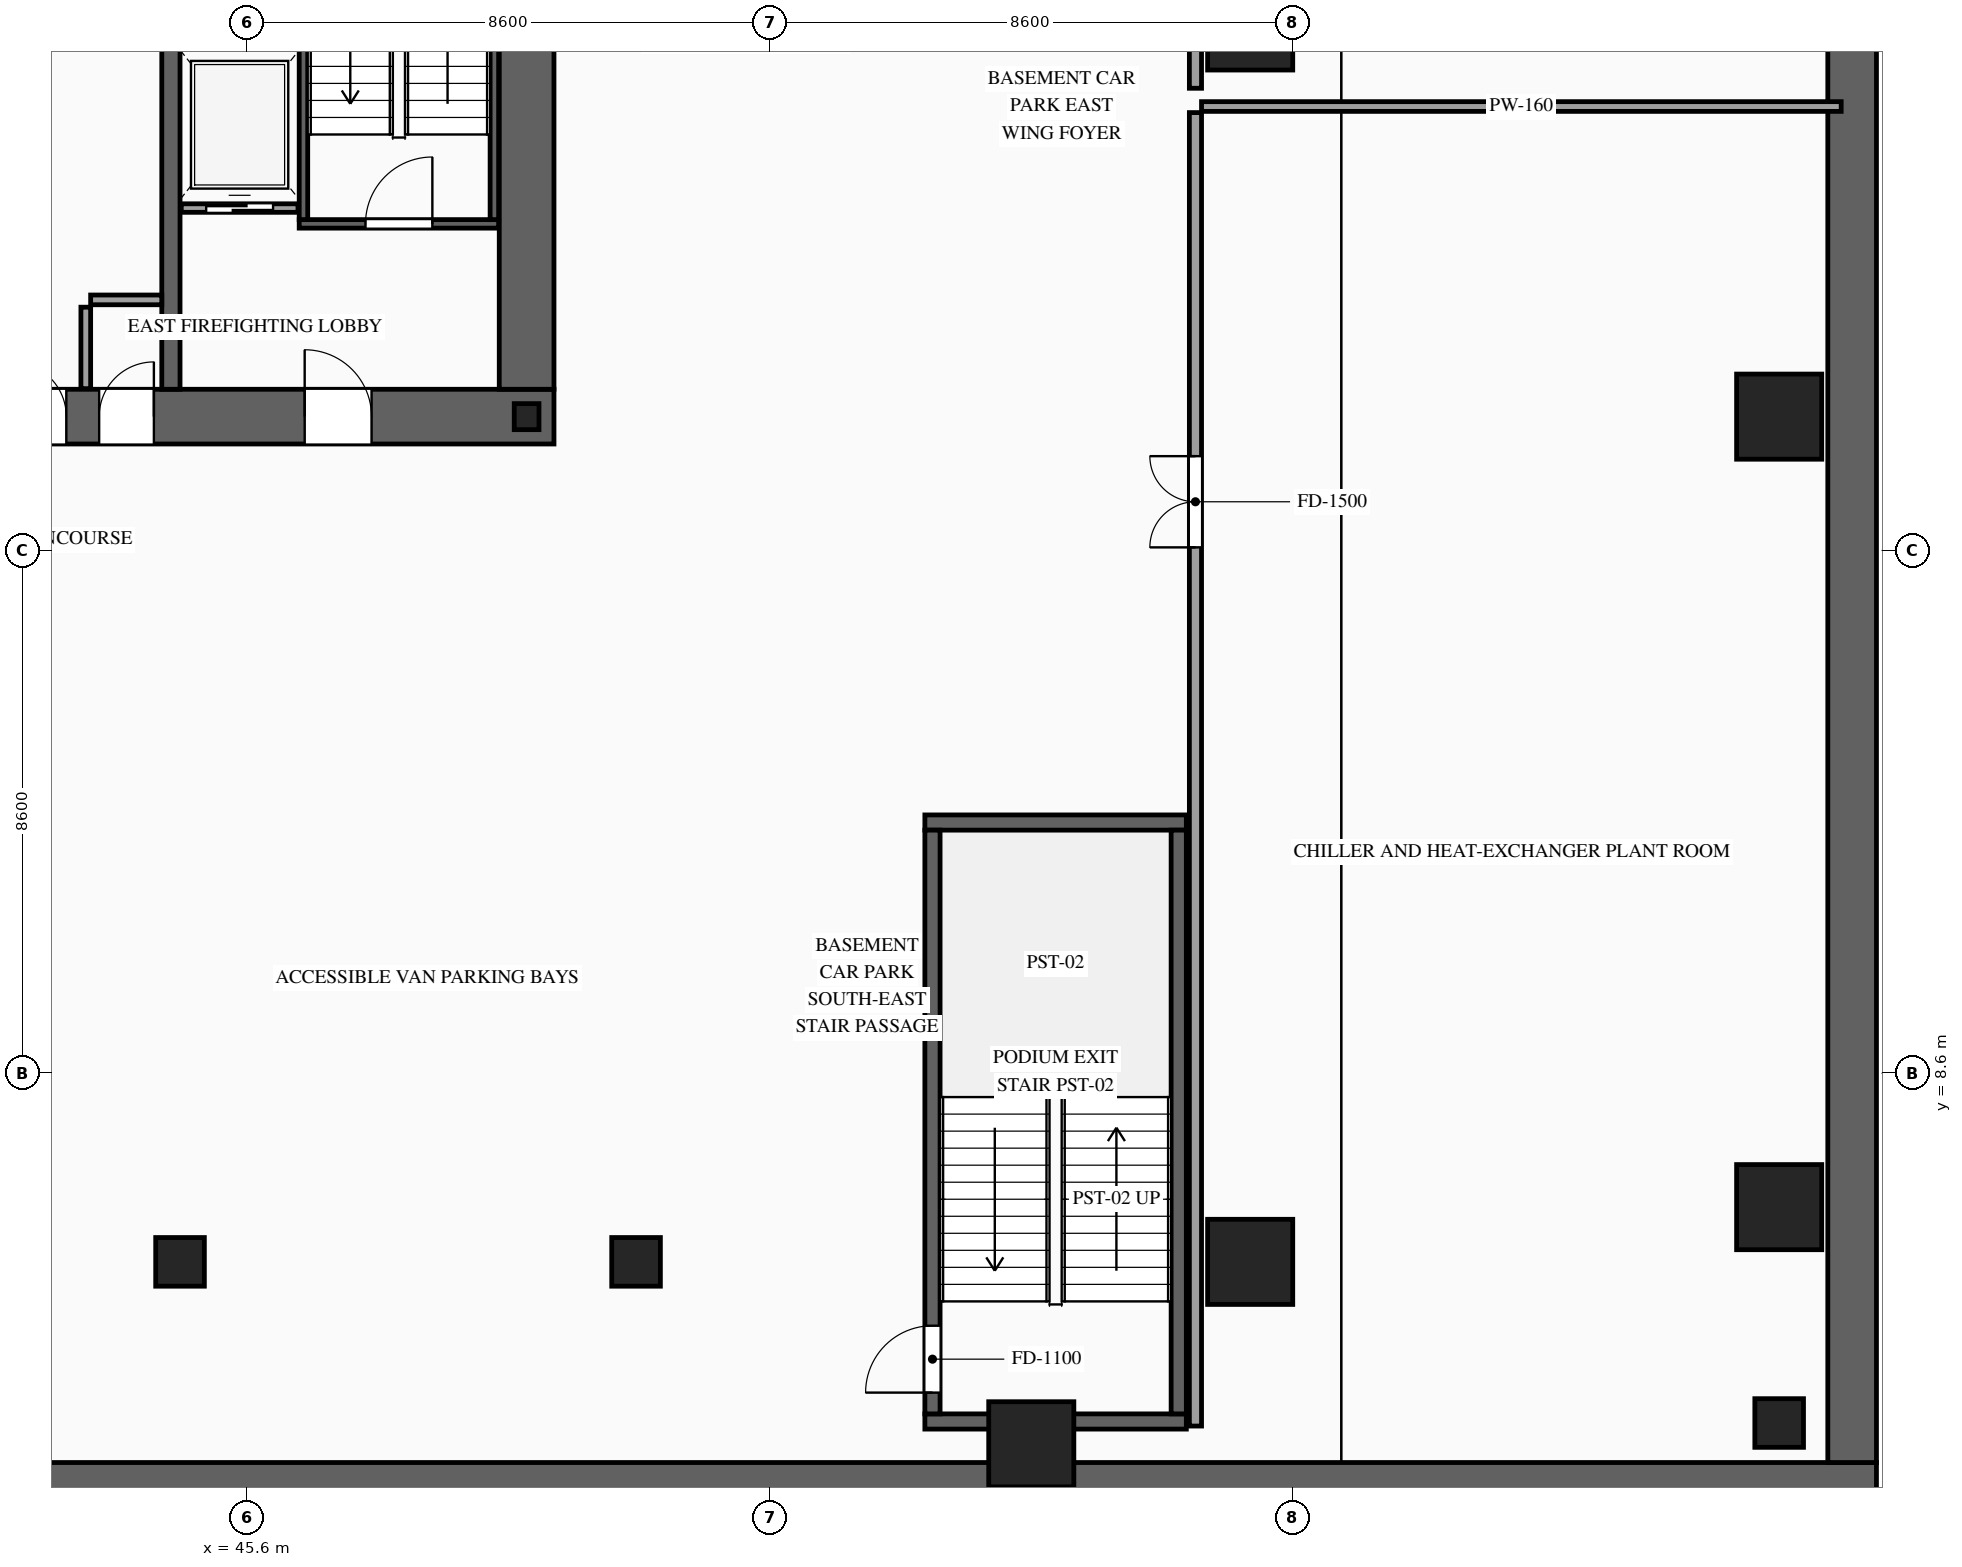
"""IFC4 building model, lengths in metres.
Left out: names, types, materials, properties, quantities, classifications, styles, units other than length and angle.
Written with IfcOpenShell. Run it as: python <this file> out.ifc"""

import sys

from ifc_helpers import new_model, si_unit, direction, frame, frame_2d, origin, origin_2d, place, context, subcontext, project, spatial, rectangle, i_section, extrude, source, transform, mapped, element, fill, save


model = new_model("IFC4")
c1 = context("Model", 3, precision=1e-05, world=origin(), true_north=direction((0.0, 1.0)))
c2 = subcontext(c1, "Body", "Model", "MODEL_VIEW")
j1 = project(units=[si_unit("LENGTHUNIT", "METRE"), si_unit("PLANEANGLEUNIT", "RADIAN")], contexts=[c1])
p1 = place(None, origin())
s1 = spatial("IfcSite", under=j1, at=p1, CompositionType="ELEMENT")
p2 = place(p1, origin())
s2 = spatial("IfcBuilding", under=s1, at=p2, CompositionType="ELEMENT")
p3 = place(p2, frame((0.0, 0.0, -9.0)))
s3 = spatial("IfcBuildingStorey", under=s2, at=p3, CompositionType="ELEMENT", Elevation=-9.0)
m1 = source(origin(), c2, "Body", "SweptSolid", [
    extrude(rectangle(XDim=70.8, YDim=0.8, at=frame_2d((35.4, 0.0))), origin(), (0.0, 0.0, 1.0), 4.5),
])
p4 = place(p3, frame((1.6, 1.8, 0.0), z_axis=(0.0, 0.0, 1.0), x_axis=(1.0, 0.0, 0.0)))
e1 = element("IfcWall", 1, at=p4, inside=s3, PredefinedType="USERDEFINED", context=c2, shape_type="MappedRepresentation", body=[
    mapped(m1, transform((0.0, 0.0, 0.0), scale=1.0)),
])
m2 = source(origin(), c2, "Body", "SweptSolid", [
    extrude(rectangle(XDim=47.2, YDim=0.8, at=frame_2d((23.6, 0.0))), origin(), (0.0, 0.0, 1.0), 4.5),
])
p5 = place(p3, frame((72.0, 2.2, 0.0), z_axis=(0.0, 0.0, 1.0), x_axis=(0.0, 1.0, 0.0)))
e2 = element("IfcWall", 2, at=p5, inside=s3, PredefinedType="USERDEFINED", context=c2, shape_type="MappedRepresentation", body=[
    mapped(m2, transform((0.0, 0.0, 0.0), scale=1.0)),
])
p6 = place(p3, frame((23.35, 19.4, 0.0), z_axis=(0.0, 0.0, 1.0), x_axis=(1.0, 0.0, 0.0)))
e3 = element("IfcWall", 3, at=p6, inside=s3, PredefinedType="SHEAR", context=c2, shape_type="SweptSolid", body=[
    extrude(rectangle(XDim=27.3, YDim=0.9, at=frame_2d((13.65, 0.0))), origin(), (0.0, 0.0, 1.0), 4.5),
])
p7 = place(p6, frame((2.1, 0.0, 0.0)))
e4 = element("IfcOpeningElement", 4, at=p7, cuts=e3, PredefinedType="OPENING", context=c2, shape_type="SweptSolid", body=[
    extrude(rectangle(XDim=1.1, YDim=2.2, at=frame_2d((0.55, 1.1))), frame((0.0, 0.465, 0.0), z_axis=(0.0, -1.0, 0.0), x_axis=(1.0, 0.0, 0.0)), (0.0, 0.0, 1.0), 0.93),
])
p8 = place(p6, frame((10.0, 0.0, 0.0)))
e5 = element("IfcOpeningElement", 5, at=p8, cuts=e3, PredefinedType="OPENING", context=c2, shape_type="SweptSolid", body=[
    extrude(rectangle(XDim=1.1, YDim=2.2, at=frame_2d((0.55, 1.1))), frame((0.0, 0.465, 0.0), z_axis=(0.0, -1.0, 0.0), x_axis=(1.0, 0.0, 0.0)), (0.0, 0.0, 1.0), 0.93),
])
p9 = place(p6, frame((23.2, 0.0, 0.0)))
e6 = element("IfcOpeningElement", 6, at=p9, cuts=e3, PredefinedType="OPENING", context=c2, shape_type="SweptSolid", body=[
    extrude(rectangle(XDim=1.1, YDim=2.2, at=frame_2d((0.55, 1.1))), frame((0.0, 0.465, 0.0), z_axis=(0.0, -1.0, 0.0), x_axis=(1.0, 0.0, 0.0)), (0.0, 0.0, 1.0), 0.93),
])
p10 = place(p6, frame((19.82, 0.0, 0.0)))
e7 = element("IfcOpeningElement", 7, at=p10, cuts=e3, PredefinedType="OPENING", context=c2, shape_type="SweptSolid", body=[
    extrude(rectangle(XDim=0.9, YDim=2.15, at=frame_2d((0.45, 1.075))), frame((0.0, 0.465, 0.0), z_axis=(0.0, -1.0, 0.0), x_axis=(1.0, 0.0, 0.0)), (0.0, 0.0, 1.0), 0.93),
])
p11 = place(p6, frame((18.38, 0.0, 0.0)))
e8 = element("IfcOpeningElement", 8, at=p11, cuts=e3, PredefinedType="OPENING", context=c2, shape_type="SweptSolid", body=[
    extrude(rectangle(XDim=0.9, YDim=2.15, at=frame_2d((0.45, 1.075))), frame((0.0, 0.465, 0.0), z_axis=(0.0, -1.0, 0.0), x_axis=(1.0, 0.0, 0.0)), (0.0, 0.0, 1.0), 0.93),
])
m3 = source(origin(), c2, "Body", "SweptSolid", [
    extrude(rectangle(XDim=11.9, YDim=0.9, at=frame_2d((5.95, 0.0))), origin(), (0.0, 0.0, 1.0), 4.5),
])
p12 = place(p3, frame((50.2, 19.85, 0.0), z_axis=(0.0, 0.0, 1.0), x_axis=(0.0, 1.0, 0.0)))
e9 = element("IfcWall", 9, at=p12, inside=s3, PredefinedType="SHEAR", context=c2, shape_type="MappedRepresentation", body=[
    mapped(m3, transform((0.0, 0.0, 0.0), scale=1.0)),
])
m4 = source(origin(), c2, "Body", "SweptSolid", [
    extrude(rectangle(XDim=11.9, YDim=0.3, at=frame_2d((5.95, 0.0))), origin(), (0.0, 0.0, 1.0), 4.5),
])
p13 = place(p3, frame((44.35, 19.85, 0.0), z_axis=(0.0, 0.0, 1.0), x_axis=(0.0, 1.0, 0.0)))
e10 = element("IfcWall", 10, at=p13, inside=s3, PredefinedType="SOLIDWALL", context=c2, shape_type="MappedRepresentation", body=[
    mapped(m4, transform((0.0, 0.0, 0.0), scale=1.0)),
])
m5 = source(origin(), c2, "Body", "SweptSolid", [
    extrude(rectangle(XDim=0.8, YDim=0.8, at=origin_2d()), origin(), (0.0, 0.0, 1.0), 4.2),
])
for number, where, z_axis, x_axis in (
    (11, (44.5, 5.5, 0.0), (0.0, 0.0, 1.0), (1.0, 0.0, 0.0)),
    (12, (52.0, 5.5, 0.0), (0.0, 0.0, 1.0), (1.0, 0.0, 0.0)),
):
    element("IfcColumn", number, at=place(p3, frame(where, z_axis=z_axis, x_axis=x_axis)), inside=s3, PredefinedType="COLUMN", context=c2, shape_type="MappedRepresentation", body=[
        mapped(m5, transform((0.0, 0.0, 0.0), scale=1.0)),
    ])
m6 = source(origin(), c2, "Body", "SweptSolid", [
    extrude(i_section(OverallWidth=0.407, OverallDepth=0.428, WebThickness=0.02, FlangeThickness=0.035, at=origin_2d()), origin(), (0.0, 0.0, 1.0), 4.5),
])
p14 = place(p3, frame((50.2, 19.4, 0.0), z_axis=(0.0, 0.0, 1.0), x_axis=(1.0, 0.0, 0.0)))
e13 = element("IfcColumn", 13, at=p14, inside=s3, PredefinedType="COLUMN", context=c2, shape_type="MappedRepresentation", body=[
    mapped(m6, transform((0.0, 0.0, 0.0), scale=1.0)),
])
m7 = source(origin(), c2, "Body", "SweptSolid", [
    extrude(rectangle(XDim=0.8, YDim=0.8, at=origin_2d()), origin(), (0.0, 0.0, 1.0), 4.5),
])
p15 = place(p3, frame((70.8, 2.85, 0.0), z_axis=(0.0, 0.0, 1.0), x_axis=(1.0, 0.0, 0.0)))
e14 = element("IfcColumn", 14, at=p15, inside=s3, PredefinedType="COLUMN", context=c2, shape_type="MappedRepresentation", body=[
    mapped(m7, transform((0.0, 0.0, 0.0), scale=1.0)),
])
m8 = source(origin(), c2, "Body", "SweptSolid", [
    extrude(rectangle(XDim=1.4, YDim=1.4, at=origin_2d()), origin(), (0.0, 0.0, 1.0), 4.5),
])
for number, where, z_axis, x_axis in (
    (15, (70.8, 6.4, 0.0), (0.0, 0.0, 1.0), (1.0, 0.0, 0.0)),
    (16, (70.8, 19.4, 0.0), (0.0, 0.0, 1.0), (1.0, 0.0, 0.0)),
    (17, (62.1, 5.5, 0.0), (0.0, 0.0, 1.0), (1.0, 0.0, 0.0)),
    (18, (62.1, 25.8, 0.0), (0.0, 0.0, 1.0), (1.0, 0.0, 0.0)),
    (19, (58.5, 2.5, 0.0), (0.0, 0.0, 1.0), (1.0, 0.0, 0.0)),
):
    element("IfcColumn", number, at=place(p3, frame(where, z_axis=z_axis, x_axis=x_axis)), inside=s3, PredefinedType="COLUMN", context=c2, shape_type="MappedRepresentation", body=[
        mapped(m8, transform((0.0, 0.0, 0.0), scale=1.0)),
    ])
p16 = place(p3, frame((44.52, 22.83, 0.0), z_axis=(0.0, 0.0, 1.0), x_axis=(1.0, 0.0, 0.0)))
e20 = element("IfcWall", 20, at=p16, inside=s3, PredefinedType="SOLIDWALL", context=c2, shape_type="SweptSolid", body=[
    extrude(rectangle(XDim=1.92, YDim=0.14, at=frame_2d((0.96, 0.0))), origin(), (0.0, 0.0, 1.0), 4.2),
])
p17 = place(p16, frame((0.41, 0.0, 0.0)))
e21 = element("IfcOpeningElement", 21, at=p17, cuts=e20, PredefinedType="OPENING", context=c2, shape_type="SweptSolid", body=[
    extrude(rectangle(XDim=1.1, YDim=2.2, at=frame_2d((0.55, 1.1))), frame((0.0, 0.085, 0.0), z_axis=(0.0, -1.0, 0.0), x_axis=(1.0, 0.0, 0.0)), (0.0, 0.0, 1.0), 0.17),
])
p18 = place(p3, frame((46.46, 22.57, 0.0), z_axis=(0.0, 0.0, 1.0), x_axis=(1.0, 0.0, 0.0)))
e22 = element("IfcWall", 22, at=p18, inside=s3, PredefinedType="SOLIDWALL", context=c2, shape_type="SweptSolid", body=[
    extrude(rectangle(XDim=3.28, YDim=0.14, at=frame_2d((1.64, 0.0))), origin(), (0.0, 0.0, 1.0), 4.2),
])
p19 = place(p18, frame((1.09, 0.0, 0.0)))
e23 = element("IfcOpeningElement", 23, at=p19, cuts=e22, PredefinedType="OPENING", context=c2, shape_type="SweptSolid", body=[
    extrude(rectangle(XDim=1.1, YDim=2.2, at=frame_2d((0.55, 1.1))), frame((0.0, 0.085, 0.0), z_axis=(0.0, -1.0, 0.0), x_axis=(1.0, 0.0, 0.0)), (0.0, 0.0, 1.0), 0.17),
])
m9 = source(origin(), c2, "Body", "SweptSolid", [
    extrude(rectangle(XDim=8.94, YDim=0.14, at=frame_2d((4.47, 0.0))), origin(), (0.0, 0.0, 1.0), 4.2),
])
for number, where, z_axis, x_axis in (
    (24, (46.53, 22.64, 0.0), (0.0, 0.0, 1.0), (0.0, 1.0, 0.0)),
    (25, (49.67, 22.64, 0.0), (0.0, 0.0, 1.0), (0.0, 1.0, 0.0)),
):
    element("IfcWall", number, at=place(p3, frame(where, z_axis=z_axis, x_axis=x_axis)), inside=s3, PredefinedType="SOLIDWALL", context=c2, shape_type="MappedRepresentation", body=[
        mapped(m9, transform((0.0, 0.0, 0.0), scale=1.0)),
    ])
m10 = source(origin(), c2, "Body", "SweptSolid", [
    extrude(rectangle(XDim=4.3, YDim=0.25, at=frame_2d((2.15, 0.0))), origin(), (0.0, 0.0, 1.0), 4.2),
])
for number, where, z_axis, x_axis in (
    (26, (56.75, 2.875, 0.0), (0.0, 0.0, 1.0), (1.0, 0.0, 0.0)),
    (27, (56.75, 12.725, 0.0), (0.0, 0.0, 1.0), (1.0, 0.0, 0.0)),
):
    element("IfcWall", number, at=place(p3, frame(where, z_axis=z_axis, x_axis=x_axis)), inside=s3, PredefinedType="SOLIDWALL", context=c2, shape_type="MappedRepresentation", body=[
        mapped(m10, transform((0.0, 0.0, 0.0), scale=1.0)),
    ])
p20 = place(p3, frame((56.875, 3.0, 0.0), z_axis=(0.0, 0.0, 1.0), x_axis=(0.0, 1.0, 0.0)))
e28 = element("IfcWall", 28, at=p20, inside=s3, PredefinedType="SOLIDWALL", context=c2, shape_type="SweptSolid", body=[
    extrude(rectangle(XDim=9.6, YDim=0.25, at=frame_2d((4.8, 0.0))), origin(), (0.0, 0.0, 1.0), 4.2),
])
p21 = place(p20, frame((0.35, 0.0, 0.0)))
e29 = element("IfcOpeningElement", 29, at=p21, cuts=e28, PredefinedType="OPENING", context=c2, shape_type="SweptSolid", body=[
    extrude(rectangle(XDim=1.1, YDim=2.2, at=frame_2d((0.55, 1.1))), frame((0.0, 0.14, 0.0), z_axis=(0.0, -1.0, 0.0), x_axis=(1.0, 0.0, 0.0)), (0.0, 0.0, 1.0), 0.28),
])
m11 = source(origin(), c2, "Body", "SweptSolid", [
    extrude(rectangle(XDim=9.6, YDim=0.25, at=frame_2d((4.8, 0.0))), origin(), (0.0, 0.0, 1.0), 4.2),
])
p22 = place(p3, frame((60.925, 3.0, 0.0), z_axis=(0.0, 0.0, 1.0), x_axis=(0.0, 1.0, 0.0)))
e30 = element("IfcWall", 30, at=p22, inside=s3, PredefinedType="SOLIDWALL", context=c2, shape_type="MappedRepresentation", body=[
    mapped(m11, transform((0.0, 0.0, 0.0), scale=1.0)),
])
m12 = source(origin(), c2, "Body", "SweptSolid", [
    extrude(rectangle(XDim=1.34, YDim=0.16, at=frame_2d((0.67, 0.0))), origin(), (0.0, 0.0, 1.0), 4.2),
])
p23 = place(p3, frame((42.95, 19.86, 0.0), z_axis=(0.0, 0.0, 1.0), x_axis=(0.0, 1.0, 0.0)))
e31 = element("IfcWall", 31, at=p23, inside=s3, PredefinedType="PARTITIONING", context=c2, shape_type="MappedRepresentation", body=[
    mapped(m12, transform((0.0, 0.0, 0.0), scale=1.0)),
])
m13 = source(origin(), c2, "Body", "SweptSolid", [
    extrude(rectangle(XDim=1.17, YDim=0.16, at=frame_2d((0.585, 0.0))), origin(), (0.0, 0.0, 1.0), 4.2),
])
p24 = place(p3, frame((43.03, 21.32, 0.0), z_axis=(0.0, 0.0, 1.0), x_axis=(1.0, 0.0, 0.0)))
e32 = element("IfcWall", 32, at=p24, inside=s3, PredefinedType="PARTITIONING", context=c2, shape_type="MappedRepresentation", body=[
    mapped(m13, transform((0.0, 0.0, 0.0), scale=1.0)),
])
p25 = place(p3, frame((61.2, 2.8, 0.0), z_axis=(0.0, 0.0, 1.0), x_axis=(0.0, 1.0, 0.0)))
e33 = element("IfcWall", 33, at=p25, inside=s3, PredefinedType="PARTITIONING", context=c2, shape_type="SweptSolid", body=[
    extrude(rectangle(XDim=21.6, YDim=0.2, at=frame_2d((10.8, 0.0))), origin(), (0.0, 0.0, 1.0), 4.2),
])
p26 = place(p25, frame((14.45, 0.0, 0.0)))
e34 = element("IfcOpeningElement", 34, at=p26, cuts=e33, PredefinedType="OPENING", context=c2, shape_type="SweptSolid", body=[
    extrude(rectangle(XDim=1.5, YDim=2.3, at=frame_2d((0.75, 1.15))), frame((0.0, 0.115, 0.0), z_axis=(0.0, -1.0, 0.0), x_axis=(1.0, 0.0, 0.0)), (0.0, 0.0, 1.0), 0.23),
])
m14 = source(origin(), c2, "Body", "SweptSolid", [
    extrude(rectangle(XDim=10.52, YDim=0.16, at=frame_2d((5.26, 0.0))), origin(), (0.0, 0.0, 1.0), 4.2),
])
p27 = place(p3, frame((61.3, 24.5, 0.0), z_axis=(0.0, 0.0, 1.0), x_axis=(1.0, 0.0, 0.0)))
e35 = element("IfcWall", 35, at=p27, inside=s3, PredefinedType="PARTITIONING", context=c2, shape_type="MappedRepresentation", body=[
    mapped(m14, transform((0.0, 0.0, 0.0), scale=1.0)),
])
p28 = place(p3, frame((61.2, 24.8, 0.0), z_axis=(0.0, 0.0, 1.0), x_axis=(0.0, 1.0, 0.0)))
e36 = element("IfcWall", 36, at=p28, inside=s3, PredefinedType="PARTITIONING", context=c2, shape_type="SweptSolid", body=[
    extrude(rectangle(XDim=24.0, YDim=0.2, at=frame_2d((12.0, 0.0))), origin(), (0.0, 0.0, 1.0), 4.2),
])
p29 = place(p28, frame((5.45, 0.0, 0.0)))
e37 = element("IfcOpeningElement", 37, at=p29, cuts=e36, PredefinedType="OPENING", context=c2, shape_type="SweptSolid", body=[
    extrude(rectangle(XDim=1.5, YDim=2.3, at=frame_2d((0.75, 1.15))), frame((0.0, 0.115, 0.0), z_axis=(0.0, -1.0, 0.0), x_axis=(1.0, 0.0, 0.0)), (0.0, 0.0, 1.0), 0.23),
])
m15 = source(origin(), c2, "Body", "SweptSolid", [
    extrude(rectangle(XDim=1.1, YDim=2.2, at=frame_2d((0.55, 1.1))), frame((0.0, 0.025, 0.0), z_axis=(0.0, -1.0, 0.0), x_axis=(1.0, 0.0, 0.0)), (0.0, 0.0, 1.0), 0.05),
])
p30 = place(p17, origin())
e38 = element("IfcDoor", 38, at=p30, inside=s3, OperationType="SLIDING_TO_RIGHT", PredefinedType="DOOR", context=c2, shape_type="MappedRepresentation", body=[
    mapped(m15, transform((0.0, 0.0, 0.0), scale=1.0)),
])
fill(e21, e38)
m16 = source(origin(), c2, "Body", "SweptSolid", [
    extrude(rectangle(XDim=1.1, YDim=2.2, at=frame_2d((0.55, 1.1))), frame((0.0, 0.025, 0.0), z_axis=(0.0, -1.0, 0.0), x_axis=(1.0, 0.0, 0.0)), (0.0, 0.0, 1.0), 0.05),
])
p31 = place(p19, origin())
e39 = element("IfcDoor", 39, at=p31, inside=s3, OperationType="SINGLE_SWING_RIGHT", PredefinedType="DOOR", context=c2, shape_type="MappedRepresentation", body=[
    mapped(m16, transform((0.0, 0.0, 0.0), scale=1.0)),
])
fill(e23, e39)
p32 = place(p21, origin())
e40 = element("IfcDoor", 40, at=p32, inside=s3, OperationType="SINGLE_SWING_LEFT", PredefinedType="DOOR", context=c2, shape_type="MappedRepresentation", body=[
    mapped(m16, transform((0.0, 0.0, 0.0), scale=1.0)),
])
fill(e29, e40)
p33 = place(p9, origin())
e41 = element("IfcDoor", 41, at=p33, inside=s3, OperationType="SINGLE_SWING_LEFT", PredefinedType="DOOR", context=c2, shape_type="MappedRepresentation", body=[
    mapped(m16, transform((0.0, 0.0, 0.0), scale=1.0)),
])
fill(e6, e41)
m17 = source(origin(), c2, "Body", "SweptSolid", [
    extrude(rectangle(XDim=0.9, YDim=2.15, at=frame_2d((0.45, 1.075))), frame((0.0, 0.025, 0.0), z_axis=(0.0, -1.0, 0.0), x_axis=(1.0, 0.0, 0.0)), (0.0, 0.0, 1.0), 0.05),
])
p34 = place(p10, origin())
e42 = element("IfcDoor", 42, at=p34, inside=s3, OperationType="SINGLE_SWING_RIGHT", PredefinedType="DOOR", context=c2, shape_type="MappedRepresentation", body=[
    mapped(m17, transform((0.0, 0.0, 0.0), scale=1.0)),
])
fill(e7, e42)
p35 = place(p11, origin())
e43 = element("IfcDoor", 43, at=p35, inside=s3, OperationType="SINGLE_SWING_LEFT", PredefinedType="DOOR", context=c2, shape_type="MappedRepresentation", body=[
    mapped(m17, transform((0.0, 0.0, 0.0), scale=1.0)),
])
fill(e8, e43)
m18 = source(origin(), c2, "Body", "SweptSolid", [
    extrude(rectangle(XDim=1.5, YDim=2.3, at=frame_2d((0.75, 1.15))), frame((0.0, 0.025, 0.0), z_axis=(0.0, -1.0, 0.0), x_axis=(1.0, 0.0, 0.0)), (0.0, 0.0, 1.0), 0.05),
])
p36 = place(p26, origin())
e44 = element("IfcDoor", 44, at=p36, inside=s3, OperationType="DOUBLE_DOOR_SINGLE_SWING", PredefinedType="DOOR", context=c2, shape_type="MappedRepresentation", body=[
    mapped(m18, transform((0.0, 0.0, 0.0), scale=1.0)),
])
fill(e34, e44)
save(model, sys.argv[1])
